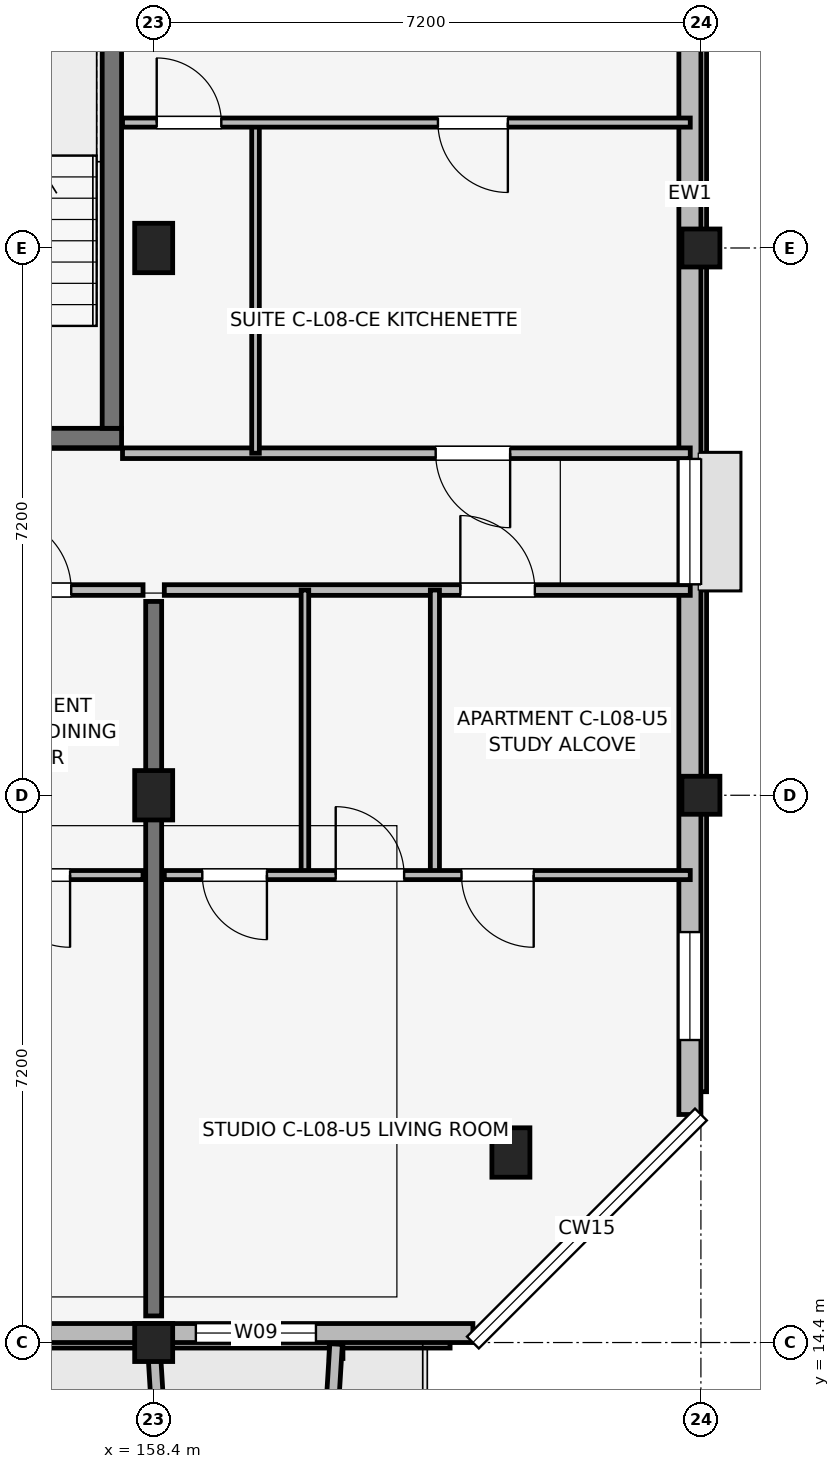
"""IFC4 building model, lengths in metres.
Left out: names, types, materials, properties, quantities, classifications, styles, units other than length and angle.
Written with IfcOpenShell. Run it as: python <this file> out.ifc"""

import sys

from ifc_helpers import new_model, si_unit, direction, frame, frame_2d, origin, origin_2d, place, context, subcontext, project, spatial, rectangle, extrude, element, fill, save


model = new_model("IFC4")
c1 = context("Model", 3, precision=1e-05, world=origin(), true_north=direction((0.0, 1.0)))
c2 = subcontext(c1, "Body", "Model", "MODEL_VIEW")
j1 = project(units=[si_unit("LENGTHUNIT", "METRE"), si_unit("PLANEANGLEUNIT", "RADIAN")], contexts=[c1])
p1 = place(None, origin())
s1 = spatial("IfcSite", under=j1, at=p1, CompositionType="ELEMENT")
p2 = place(p1, origin())
s2 = spatial("IfcBuilding", under=s1, at=p2, CompositionType="ELEMENT")
p3 = place(p2, frame((0.0, 0.0, 27.6)))
s3 = spatial("IfcBuildingStorey", under=s2, at=p3, CompositionType="ELEMENT", Elevation=27.6)
p4 = place(p3, frame((158.4, 14.4, 0.0), z_axis=(0.0, 0.0, 1.0), x_axis=(1.0, 0.0, 0.0)))
e1 = element("IfcColumn", 1, at=p4, inside=s3, PredefinedType="COLUMN", context=c2, shape_type="SweptSolid", body=[
    extrude(rectangle(XDim=0.5, YDim=0.5, at=origin_2d()), origin(), (0.0, 0.0, 1.0), 3.15),
])
for number, where, z_axis, x_axis in (
    (2, (158.4, 21.6, 0.0), (0.0, 0.0, 1.0), (1.0, 0.0, 0.0)),
    (3, (158.4, 28.8, 0.0), (0.0, 0.0, 1.0), (1.0, 0.0, 0.0)),
    (4, (163.1, 16.9, 0.0), (0.0, 0.0, 1.0), (1.0, 0.0, 0.0)),
):
    element("IfcColumn", number, at=place(p3, frame(where, z_axis=z_axis, x_axis=x_axis)), inside=s3, PredefinedType="COLUMN", context=c2, shape_type="SweptSolid", body=[
        extrude(rectangle(XDim=0.5, YDim=0.65, at=origin_2d()), origin(), (0.0, 0.0, 1.0), 3.15),
    ])
for number, where, z_axis, x_axis in (
    (5, (165.6, 21.6, 0.0), (0.0, 0.0, 1.0), (1.0, 0.0, 0.0)),
    (6, (165.6, 28.8, 0.0), (0.0, 0.0, 1.0), (1.0, 0.0, 0.0)),
):
    element("IfcColumn", number, at=place(p3, frame(where, z_axis=z_axis, x_axis=x_axis)), inside=s3, PredefinedType="COLUMN", context=c2, shape_type="SweptSolid", body=[
        extrude(rectangle(XDim=0.5, YDim=0.5, at=origin_2d()), origin(), (0.0, 0.0, 1.0), 3.15),
    ])
p5 = place(p3, frame((154.673, 26.3, 0.0), z_axis=(0.0, 0.0, 1.0), x_axis=(1.0, 0.0, 0.0)))
e7 = element("IfcWall", 7, at=p5, inside=s3, PredefinedType="SHEAR", context=c2, shape_type="SweptSolid", body=[
    extrude(rectangle(XDim=3.305, YDim=0.255, at=frame_2d((1.652, 0.0))), origin(), (0.0, 0.0, 1.0), 3.15),
])
p6 = place(p5, frame((1.127, 0.0, 0.0)))
e8 = element("IfcOpeningElement", 8, at=p6, cuts=e7, PredefinedType="OPENING", context=c2, shape_type="SweptSolid", body=[
    extrude(rectangle(XDim=1.05, YDim=2.12, at=frame_2d((0.525, 1.06))), frame((0.0, 0.137, 0.0), z_axis=(0.0, -1.0, 0.0), x_axis=(1.0, 0.0, 0.0)), (0.0, 0.0, 1.0), 0.275),
])
p7 = place(p3, frame((157.85, 26.427, 0.0), z_axis=(0.0, 0.0, 1.0), x_axis=(0.0, 1.0, 0.0)))
e9 = element("IfcWall", 9, at=p7, inside=s3, PredefinedType="SHEAR", context=c2, shape_type="SweptSolid", body=[
    extrude(rectangle(XDim=6.295, YDim=0.255, at=frame_2d((3.147, 0.0))), origin(), (0.0, 0.0, 1.0), 3.15),
])
p8 = place(p3, frame((158.4, 14.75, 0.0), z_axis=(0.0, 0.0, 1.0), x_axis=(0.0, 1.0, 0.0)))
e10 = element("IfcWall", 10, at=p8, inside=s3, PredefinedType="SHEAR", context=c2, shape_type="SweptSolid", body=[
    extrude(rectangle(XDim=9.4, YDim=0.21, at=frame_2d((4.7, 0.0))), origin(), (0.0, 0.0, 1.0), 3.15),
])
p9 = place(p3, frame((132.6, 14.525, 0.0), z_axis=(0.0, 0.0, 1.0), x_axis=(1.0, 0.0, 0.0)))
e11 = element("IfcWall", 11, at=p9, inside=s3, PredefinedType="SOLIDWALL", context=c2, shape_type="SweptSolid", body=[
    extrude(rectangle(XDim=30.0, YDim=0.25, at=frame_2d((15.0, 0.0))), origin(), (0.0, 0.0, 1.0), 2.43),
])
p10 = place(p9, frame((8.625, 0.0, 0.0), z_axis=(0.0, 0.0, 1.0), x_axis=(-1.0, 0.0, 0.0)))
e12 = element("IfcOpeningElement", 12, at=p10, cuts=e11, PredefinedType="OPENING", context=c2, shape_type="SweptSolid", body=[
    extrude(rectangle(XDim=1.65, YDim=2.15, at=frame_2d((0.825, 1.075))), frame((0.0, 0.135, 0.0), z_axis=(0.0, -1.0, 0.0), x_axis=(1.0, 0.0, 0.0)), (0.0, 0.0, 1.0), 0.27),
])
p11 = place(p9, frame((22.95, 0.0, 0.0), z_axis=(0.0, 0.0, 1.0), x_axis=(-1.0, 0.0, 0.0)))
e13 = element("IfcOpeningElement", 13, at=p11, cuts=e11, PredefinedType="OPENING", context=c2, shape_type="SweptSolid", body=[
    extrude(rectangle(XDim=1.5, YDim=2.15, at=frame_2d((0.75, 1.075))), frame((0.0, 0.135, 0.0), z_axis=(0.0, -1.0, 0.0), x_axis=(1.0, 0.0, 0.0)), (0.0, 0.0, 1.0), 0.27),
])
p12 = place(p9, frame((2.365, 0.0, 0.75)))
e14 = element("IfcOpeningElement", 14, at=p12, cuts=e11, PredefinedType="OPENING", context=c2, shape_type="SweptSolid", body=[
    extrude(rectangle(XDim=0.98, YDim=1.45, at=frame_2d((0.49, 0.725))), frame((0.0, 0.135, 0.0), z_axis=(0.0, -1.0, 0.0), x_axis=(1.0, 0.0, 0.0)), (0.0, 0.0, 1.0), 0.27),
])
p13 = place(p9, frame((12.11, 0.0, 0.75)))
e15 = element("IfcOpeningElement", 15, at=p13, cuts=e11, PredefinedType="OPENING", context=c2, shape_type="SweptSolid", body=[
    extrude(rectangle(XDim=1.1, YDim=1.5, at=frame_2d((0.55, 0.75))), frame((0.0, 0.135, 0.0), z_axis=(0.0, -1.0, 0.0), x_axis=(1.0, 0.0, 0.0)), (0.0, 0.0, 1.0), 0.27),
])
p14 = place(p9, frame((13.925, 0.0, 0.67)))
e16 = element("IfcOpeningElement", 16, at=p14, cuts=e11, PredefinedType="OPENING", context=c2, shape_type="SweptSolid", body=[
    extrude(rectangle(XDim=2.15, YDim=1.65, at=frame_2d((1.075, 0.825))), frame((0.0, 0.135, 0.0), z_axis=(0.0, -1.0, 0.0), x_axis=(1.0, 0.0, 0.0)), (0.0, 0.0, 1.0), 0.27),
])
p15 = place(p9, frame((26.355, 0.0, 0.7)))
e17 = element("IfcOpeningElement", 17, at=p15, cuts=e11, PredefinedType="OPENING", context=c2, shape_type="SweptSolid", body=[
    extrude(rectangle(XDim=1.58, YDim=1.6, at=frame_2d((0.79, 0.8))), frame((0.0, 0.135, 0.0), z_axis=(0.0, -1.0, 0.0), x_axis=(1.0, 0.0, 0.0)), (0.0, 0.0, 1.0), 0.27),
])
p16 = place(p3, frame((165.455, 17.4, 0.0), z_axis=(0.0, 0.0, 1.0), x_axis=(0.0, 1.0, 0.0)))
e18 = element("IfcWall", 18, at=p16, inside=s3, PredefinedType="SOLIDWALL", context=c2, shape_type="SweptSolid", body=[
    extrude(rectangle(XDim=15.6, YDim=0.29, at=frame_2d((7.8, 0.0))), origin(), (0.0, 0.0, 1.0), 2.43),
])
p17 = place(p16, frame((6.975, 0.0, 1.05)))
e19 = element("IfcOpeningElement", 19, at=p17, cuts=e18, PredefinedType="OPENING", context=c2, shape_type="SweptSolid", body=[
    extrude(rectangle(XDim=1.65, YDim=1.15, at=frame_2d((0.825, 0.575))), frame((0.0, 0.155, 0.0), z_axis=(0.0, -1.0, 0.0), x_axis=(1.0, 0.0, 0.0)), (0.0, 0.0, 1.0), 0.31),
])
p18 = place(p16, frame((0.98, 0.0, 0.72)))
e20 = element("IfcOpeningElement", 20, at=p18, cuts=e18, PredefinedType="OPENING", context=c2, shape_type="SweptSolid", body=[
    extrude(rectangle(XDim=1.42, YDim=1.6, at=frame_2d((0.71, 0.8))), frame((0.0, 0.155, 0.0), z_axis=(0.0, -1.0, 0.0), x_axis=(1.0, 0.0, 0.0)), (0.0, 0.0, 1.0), 0.31),
])
for number, where, z_axis, x_axis in (
    (21, (158.4, 14.38, 0.0), (0.0, 0.0, 1.0), (0.061, -0.998, 0.0)),
    (22, (160.8, 14.38, 0.0), (0.0, 0.0, 1.0), (-0.061, -0.998, 0.0)),
):
    element("IfcWall", number, at=place(p3, frame(where, z_axis=z_axis, x_axis=x_axis)), inside=s3, PredefinedType="ELEMENTEDWALL", context=c2, shape_type="SweptSolid", body=[
        extrude(rectangle(XDim=1.964, YDim=0.165, at=frame_2d((0.982, 0.0))), origin(), (0.0, 0.0, 1.0), 2.95),
    ])
p19 = place(p3, frame((151.34, 24.3, 0.0), z_axis=(0.0, 0.0, 1.0), x_axis=(1.0, 0.0, 0.0)))
e23 = element("IfcWall", 23, at=p19, inside=s3, PredefinedType="PARTITIONING", context=c2, shape_type="SweptSolid", body=[
    extrude(rectangle(XDim=6.92, YDim=0.14, at=frame_2d((3.46, 0.0))), origin(), (0.0, 0.0, 1.0), 2.38),
])
p20 = place(p19, frame((4.995, 0.0, 0.0)))
e24 = element("IfcOpeningElement", 24, at=p20, cuts=e23, PredefinedType="OPENING", context=c2, shape_type="SweptSolid", body=[
    extrude(rectangle(XDim=0.98, YDim=2.1, at=frame_2d((0.49, 1.05))), frame((0.0, 0.08, 0.0), z_axis=(0.0, -1.0, 0.0), x_axis=(1.0, 0.0, 0.0)), (0.0, 0.0, 1.0), 0.16),
])
p21 = place(p3, frame((151.34, 20.55, 0.0), z_axis=(0.0, 0.0, 1.0), x_axis=(1.0, 0.0, 0.0)))
e25 = element("IfcWall", 25, at=p21, inside=s3, PredefinedType="PARTITIONING", context=c2, shape_type="SweptSolid", body=[
    extrude(rectangle(XDim=6.92, YDim=0.12, at=frame_2d((3.46, 0.0))), origin(), (0.0, 0.0, 1.0), 2.38),
])
p22 = place(p21, frame((1.475, 0.0, 0.0), z_axis=(0.0, 0.0, 1.0), x_axis=(-1.0, 0.0, 0.0)))
e26 = element("IfcOpeningElement", 26, at=p22, cuts=e25, PredefinedType="OPENING", context=c2, shape_type="SweptSolid", body=[
    extrude(rectangle(XDim=0.85, YDim=2.08, at=frame_2d((0.425, 1.04))), frame((0.0, 0.07, 0.0), z_axis=(0.0, -1.0, 0.0), x_axis=(1.0, 0.0, 0.0)), (0.0, 0.0, 1.0), 0.14),
])
p23 = place(p21, frame((2.625, 0.0, 0.0)))
e27 = element("IfcOpeningElement", 27, at=p23, cuts=e25, PredefinedType="OPENING", context=c2, shape_type="SweptSolid", body=[
    extrude(rectangle(XDim=0.9, YDim=2.08, at=frame_2d((0.45, 1.04))), frame((0.0, 0.07, 0.0), z_axis=(0.0, -1.0, 0.0), x_axis=(1.0, 0.0, 0.0)), (0.0, 0.0, 1.0), 0.14),
])
p24 = place(p21, frame((5.96, 0.0, 0.0), z_axis=(0.0, 0.0, 1.0), x_axis=(-1.0, 0.0, 0.0)))
e28 = element("IfcOpeningElement", 28, at=p24, cuts=e25, PredefinedType="OPENING", context=c2, shape_type="SweptSolid", body=[
    extrude(rectangle(XDim=0.95, YDim=2.08, at=frame_2d((0.475, 1.04))), frame((0.0, 0.07, 0.0), z_axis=(0.0, -1.0, 0.0), x_axis=(1.0, 0.0, 0.0)), (0.0, 0.0, 1.0), 0.14),
])
p25 = place(p3, frame((158.54, 24.3, 0.0), z_axis=(0.0, 0.0, 1.0), x_axis=(1.0, 0.0, 0.0)))
e29 = element("IfcWall", 29, at=p25, inside=s3, PredefinedType="PARTITIONING", context=c2, shape_type="SweptSolid", body=[
    extrude(rectangle(XDim=6.92, YDim=0.14, at=frame_2d((3.46, 0.0))), origin(), (0.0, 0.0, 1.0), 2.38),
])
p26 = place(p25, frame((3.895, 0.0, 0.0)))
e30 = element("IfcOpeningElement", 30, at=p26, cuts=e29, PredefinedType="OPENING", context=c2, shape_type="SweptSolid", body=[
    extrude(rectangle(XDim=0.98, YDim=2.1, at=frame_2d((0.49, 1.05))), frame((0.0, 0.08, 0.0), z_axis=(0.0, -1.0, 0.0), x_axis=(1.0, 0.0, 0.0)), (0.0, 0.0, 1.0), 0.16),
])
p27 = place(p3, frame((160.39, 20.55, 0.0), z_axis=(0.0, 0.0, 1.0), x_axis=(0.0, 1.0, 0.0)))
e31 = element("IfcWall", 31, at=p27, inside=s3, PredefinedType="PARTITIONING", context=c2, shape_type="SweptSolid", body=[
    extrude(rectangle(XDim=3.75, YDim=0.1, at=frame_2d((1.875, 0.0))), origin(), (0.0, 0.0, 1.0), 2.38),
])
p28 = place(p3, frame((162.1, 20.55, 0.0), z_axis=(0.0, 0.0, 1.0), x_axis=(0.0, 1.0, 0.0)))
e32 = element("IfcWall", 32, at=p28, inside=s3, PredefinedType="PARTITIONING", context=c2, shape_type="SweptSolid", body=[
    extrude(rectangle(XDim=3.75, YDim=0.12, at=frame_2d((1.875, 0.0))), origin(), (0.0, 0.0, 1.0), 2.38),
])
p29 = place(p3, frame((158.54, 20.55, 0.0), z_axis=(0.0, 0.0, 1.0), x_axis=(1.0, 0.0, 0.0)))
e33 = element("IfcWall", 33, at=p29, inside=s3, PredefinedType="PARTITIONING", context=c2, shape_type="SweptSolid", body=[
    extrude(rectangle(XDim=6.92, YDim=0.12, at=frame_2d((3.46, 0.0))), origin(), (0.0, 0.0, 1.0), 2.38),
])
p30 = place(p29, frame((1.35, 0.0, 0.0), z_axis=(0.0, 0.0, 1.0), x_axis=(-1.0, 0.0, 0.0)))
e34 = element("IfcOpeningElement", 34, at=p30, cuts=e33, PredefinedType="OPENING", context=c2, shape_type="SweptSolid", body=[
    extrude(rectangle(XDim=0.85, YDim=2.08, at=frame_2d((0.425, 1.04))), frame((0.0, 0.07, 0.0), z_axis=(0.0, -1.0, 0.0), x_axis=(1.0, 0.0, 0.0)), (0.0, 0.0, 1.0), 0.14),
])
p31 = place(p29, frame((2.255, 0.0, 0.0)))
e35 = element("IfcOpeningElement", 35, at=p31, cuts=e33, PredefinedType="OPENING", context=c2, shape_type="SweptSolid", body=[
    extrude(rectangle(XDim=0.9, YDim=2.08, at=frame_2d((0.45, 1.04))), frame((0.0, 0.07, 0.0), z_axis=(0.0, -1.0, 0.0), x_axis=(1.0, 0.0, 0.0)), (0.0, 0.0, 1.0), 0.14),
])
p32 = place(p29, frame((4.86, 0.0, 0.0), z_axis=(0.0, 0.0, 1.0), x_axis=(-1.0, 0.0, 0.0)))
e36 = element("IfcOpeningElement", 36, at=p32, cuts=e33, PredefinedType="OPENING", context=c2, shape_type="SweptSolid", body=[
    extrude(rectangle(XDim=0.95, YDim=2.08, at=frame_2d((0.475, 1.04))), frame((0.0, 0.07, 0.0), z_axis=(0.0, -1.0, 0.0), x_axis=(1.0, 0.0, 0.0)), (0.0, 0.0, 1.0), 0.14),
])
p33 = place(p3, frame((157.99, 26.1, 0.0), z_axis=(0.0, 0.0, 1.0), x_axis=(1.0, 0.0, 0.0)))
e37 = element("IfcWall", 37, at=p33, inside=s3, PredefinedType="PARTITIONING", context=c2, shape_type="SweptSolid", body=[
    extrude(rectangle(XDim=7.47, YDim=0.14, at=frame_2d((3.735, 0.0))), origin(), (0.0, 0.0, 1.0), 2.38),
])
p34 = place(p33, frame((5.1, 0.0, 0.0), z_axis=(0.0, 0.0, 1.0), x_axis=(-1.0, 0.0, 0.0)))
e38 = element("IfcOpeningElement", 38, at=p34, cuts=e37, PredefinedType="OPENING", context=c2, shape_type="SweptSolid", body=[
    extrude(rectangle(XDim=0.98, YDim=2.1, at=frame_2d((0.49, 1.05))), frame((0.0, 0.08, 0.0), z_axis=(0.0, -1.0, 0.0), x_axis=(1.0, 0.0, 0.0)), (0.0, 0.0, 1.0), 0.16),
])
p35 = place(p3, frame((159.74, 26.1, 0.0), z_axis=(0.0, 0.0, 1.0), x_axis=(0.0, 1.0, 0.0)))
e39 = element("IfcWall", 39, at=p35, inside=s3, PredefinedType="PARTITIONING", context=c2, shape_type="SweptSolid", body=[
    extrude(rectangle(XDim=4.35, YDim=0.1, at=frame_2d((2.175, 0.0))), origin(), (0.0, 0.0, 1.0), 2.38),
])
p36 = place(p3, frame((157.99, 30.45, 0.0), z_axis=(0.0, 0.0, 1.0), x_axis=(1.0, 0.0, 0.0)))
e40 = element("IfcWall", 40, at=p36, inside=s3, PredefinedType="PARTITIONING", context=c2, shape_type="SweptSolid", body=[
    extrude(rectangle(XDim=7.47, YDim=0.12, at=frame_2d((3.735, 0.0))), origin(), (0.0, 0.0, 1.0), 2.38),
])
p37 = place(p36, frame((0.45, 0.0, 0.0)))
e41 = element("IfcOpeningElement", 41, at=p37, cuts=e40, PredefinedType="OPENING", context=c2, shape_type="SweptSolid", body=[
    extrude(rectangle(XDim=0.85, YDim=2.08, at=frame_2d((0.425, 1.04))), frame((0.0, 0.07, 0.0), z_axis=(0.0, -1.0, 0.0), x_axis=(1.0, 0.0, 0.0)), (0.0, 0.0, 1.0), 0.14),
])
p38 = place(p36, frame((5.07, 0.0, 0.0), z_axis=(0.0, 0.0, 1.0), x_axis=(-1.0, 0.0, 0.0)))
e42 = element("IfcOpeningElement", 42, at=p38, cuts=e40, PredefinedType="OPENING", context=c2, shape_type="SweptSolid", body=[
    extrude(rectangle(XDim=0.92, YDim=2.08, at=frame_2d((0.46, 1.04))), frame((0.0, 0.07, 0.0), z_axis=(0.0, -1.0, 0.0), x_axis=(1.0, 0.0, 0.0)), (0.0, 0.0, 1.0), 0.14),
])
p39 = place(p15, origin())
e43 = element("IfcWindow", 43, at=p39, inside=s3, PartitioningType="SINGLE_PANEL", PredefinedType="WINDOW", context=c2, shape_type="SweptSolid", body=[
    extrude(rectangle(XDim=1.58, YDim=1.6, at=frame_2d((0.79, 0.8))), frame((0.0, 0.03, 0.0), z_axis=(0.0, -1.0, 0.0), x_axis=(1.0, 0.0, 0.0)), (0.0, 0.0, 1.0), 0.06),
])
fill(e17, e43)
p40 = place(p17, origin())
e44 = element("IfcWindow", 44, at=p40, inside=s3, PartitioningType="SINGLE_PANEL", PredefinedType="WINDOW", context=c2, shape_type="SweptSolid", body=[
    extrude(rectangle(XDim=1.65, YDim=1.15, at=frame_2d((0.825, 0.575))), frame((0.0, 0.03, 0.0), z_axis=(0.0, -1.0, 0.0), x_axis=(1.0, 0.0, 0.0)), (0.0, 0.0, 1.0), 0.06),
])
fill(e19, e44)
p41 = place(p18, origin())
e45 = element("IfcWindow", 45, at=p41, inside=s3, PartitioningType="SINGLE_PANEL", PredefinedType="WINDOW", context=c2, shape_type="SweptSolid", body=[
    extrude(rectangle(XDim=1.42, YDim=1.6, at=frame_2d((0.71, 0.8))), frame((0.0, 0.03, 0.0), z_axis=(0.0, -1.0, 0.0), x_axis=(1.0, 0.0, 0.0)), (0.0, 0.0, 1.0), 0.06),
])
fill(e20, e45)
p42 = place(p20, origin())
e46 = element("IfcDoor", 46, at=p42, inside=s3, OperationType="SINGLE_SWING_LEFT", PredefinedType="DOOR", context=c2, shape_type="SweptSolid", body=[
    extrude(rectangle(XDim=0.98, YDim=2.1, at=frame_2d((0.49, 1.05))), frame((0.0, 0.025, 0.0), z_axis=(0.0, -1.0, 0.0), x_axis=(1.0, 0.0, 0.0)), (0.0, 0.0, 1.0), 0.05),
])
fill(e24, e46)
p43 = place(p24, origin())
e47 = element("IfcDoor", 47, at=p43, inside=s3, OperationType="SINGLE_SWING_RIGHT", PredefinedType="DOOR", context=c2, shape_type="SweptSolid", body=[
    extrude(rectangle(XDim=0.95, YDim=2.08, at=frame_2d((0.475, 1.04))), frame((0.0, 0.025, 0.0), z_axis=(0.0, -1.0, 0.0), x_axis=(1.0, 0.0, 0.0)), (0.0, 0.0, 1.0), 0.05),
])
fill(e28, e47)
p44 = place(p26, origin())
e48 = element("IfcDoor", 48, at=p44, inside=s3, OperationType="SINGLE_SWING_LEFT", PredefinedType="DOOR", context=c2, shape_type="SweptSolid", body=[
    extrude(rectangle(XDim=0.98, YDim=2.1, at=frame_2d((0.49, 1.05))), frame((0.0, 0.025, 0.0), z_axis=(0.0, -1.0, 0.0), x_axis=(1.0, 0.0, 0.0)), (0.0, 0.0, 1.0), 0.05),
])
fill(e30, e48)
p45 = place(p30, origin())
e49 = element("IfcDoor", 49, at=p45, inside=s3, OperationType="SINGLE_SWING_RIGHT", PredefinedType="DOOR", context=c2, shape_type="SweptSolid", body=[
    extrude(rectangle(XDim=0.85, YDim=2.08, at=frame_2d((0.425, 1.04))), frame((0.0, 0.025, 0.0), z_axis=(0.0, -1.0, 0.0), x_axis=(1.0, 0.0, 0.0)), (0.0, 0.0, 1.0), 0.05),
])
fill(e34, e49)
p46 = place(p31, origin())
e50 = element("IfcDoor", 50, at=p46, inside=s3, OperationType="SINGLE_SWING_LEFT", PredefinedType="DOOR", context=c2, shape_type="SweptSolid", body=[
    extrude(rectangle(XDim=0.9, YDim=2.08, at=frame_2d((0.45, 1.04))), frame((0.0, 0.025, 0.0), z_axis=(0.0, -1.0, 0.0), x_axis=(1.0, 0.0, 0.0)), (0.0, 0.0, 1.0), 0.05),
])
fill(e35, e50)
p47 = place(p32, origin())
e51 = element("IfcDoor", 51, at=p47, inside=s3, OperationType="SINGLE_SWING_RIGHT", PredefinedType="DOOR", context=c2, shape_type="SweptSolid", body=[
    extrude(rectangle(XDim=0.95, YDim=2.08, at=frame_2d((0.475, 1.04))), frame((0.0, 0.025, 0.0), z_axis=(0.0, -1.0, 0.0), x_axis=(1.0, 0.0, 0.0)), (0.0, 0.0, 1.0), 0.05),
])
fill(e36, e51)
p48 = place(p34, origin())
e52 = element("IfcDoor", 52, at=p48, inside=s3, OperationType="SINGLE_SWING_RIGHT", PredefinedType="DOOR", context=c2, shape_type="SweptSolid", body=[
    extrude(rectangle(XDim=0.98, YDim=2.1, at=frame_2d((0.49, 1.05))), frame((0.0, 0.025, 0.0), z_axis=(0.0, -1.0, 0.0), x_axis=(1.0, 0.0, 0.0)), (0.0, 0.0, 1.0), 0.05),
])
fill(e38, e52)
p49 = place(p37, origin())
e53 = element("IfcDoor", 53, at=p49, inside=s3, OperationType="SINGLE_SWING_LEFT", PredefinedType="DOOR", context=c2, shape_type="SweptSolid", body=[
    extrude(rectangle(XDim=0.85, YDim=2.08, at=frame_2d((0.425, 1.04))), frame((0.0, 0.025, 0.0), z_axis=(0.0, -1.0, 0.0), x_axis=(1.0, 0.0, 0.0)), (0.0, 0.0, 1.0), 0.05),
])
fill(e41, e53)
p50 = place(p38, origin())
e54 = element("IfcDoor", 54, at=p50, inside=s3, OperationType="SINGLE_SWING_RIGHT", PredefinedType="DOOR", context=c2, shape_type="SweptSolid", body=[
    extrude(rectangle(XDim=0.92, YDim=2.08, at=frame_2d((0.46, 1.04))), frame((0.0, 0.025, 0.0), z_axis=(0.0, -1.0, 0.0), x_axis=(1.0, 0.0, 0.0)), (0.0, 0.0, 1.0), 0.05),
])
fill(e42, e54)
save(model, sys.argv[1])
